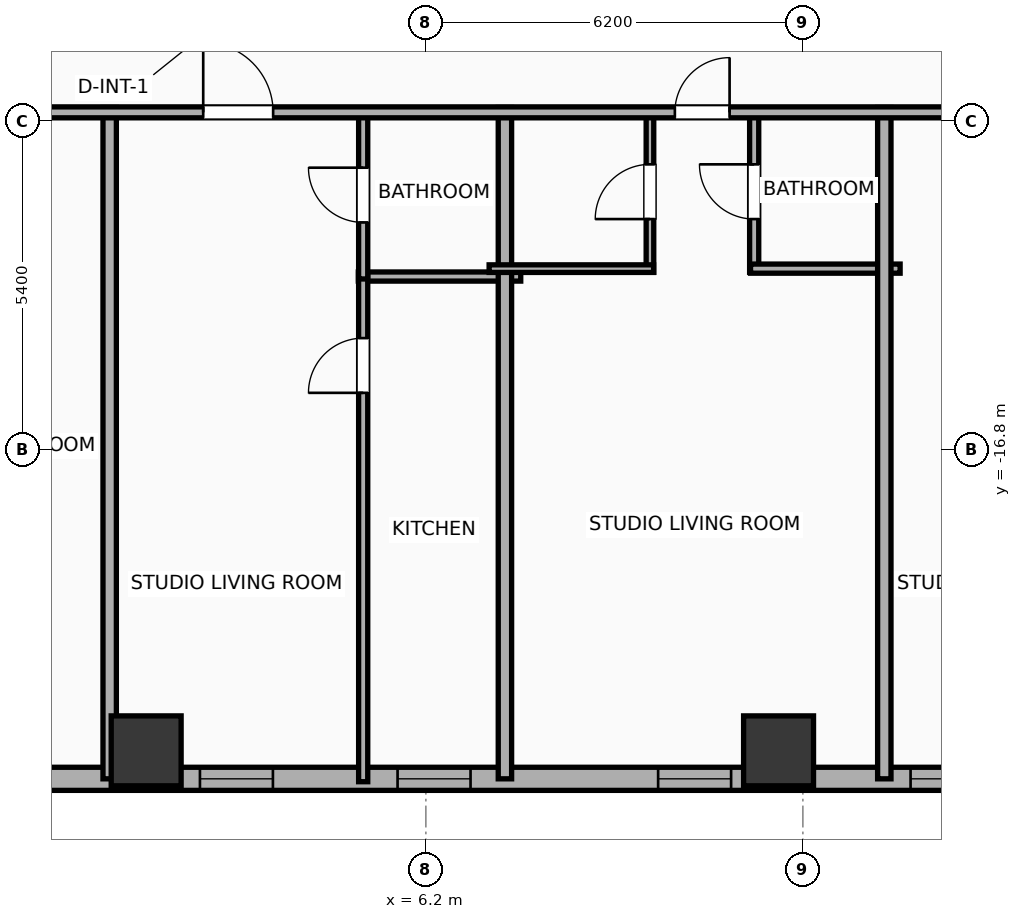
"""IFC4 building model, lengths in metres.
Left out: names, types, materials, properties, quantities, classifications, styles, units other than length and angle.
Written with IfcOpenShell. Run it as: python <this file> out.ifc"""

import sys

from ifc_helpers import new_model, si_unit, direction, frame, frame_2d, origin, origin_2d, place, context, subcontext, project, spatial, rectangle, hollow_rectangle, extrude, element, fill, save


model = new_model("IFC4")
c1 = context("Model", 3, precision=1e-05, world=origin(), true_north=direction((0.0, 1.0)))
c2 = subcontext(c1, "Body", "Model", "MODEL_VIEW")
j1 = project(units=[si_unit("LENGTHUNIT", "METRE"), si_unit("PLANEANGLEUNIT", "RADIAN")], contexts=[c1])
p1 = place(None, origin())
s1 = spatial("IfcSite", under=j1, at=p1, CompositionType="ELEMENT")
p2 = place(p1, origin())
s2 = spatial("IfcBuilding", under=s1, at=p2, CompositionType="ELEMENT")
p3 = place(p2, frame((0.0, 0.0, 76.7)))
s3 = spatial("IfcBuildingStorey", under=s2, at=p3, CompositionType="ELEMENT", Elevation=76.7)
for number, where, z_axis, x_axis in (
    (1, (1.6, -21.75, 0.0), (0.0, 0.0, 1.0), (1.0, 0.0, 0.0)),
    (2, (12.0, -21.75, 0.0), (0.0, 0.0, 1.0), (1.0, 0.0, 0.0)),
):
    element("IfcColumn", number, at=place(p3, frame(where, z_axis=z_axis, x_axis=x_axis)), inside=s3, PredefinedType="COLUMN", context=c2, shape_type="SweptSolid", body=[
        extrude(hollow_rectangle(XDim=1.15, YDim=1.15, WallThickness=0.04, at=origin_2d()), origin(), (0.0, 0.0, 1.0), 3.9),
    ])
p4 = place(p3, frame((22.381, -22.21, 0.0), z_axis=(0.0, 0.0, 1.0), x_axis=(-1.0, 0.0, 0.0)))
e3 = element("IfcWall", 3, at=p4, inside=s3, PredefinedType="ELEMENTEDWALL", context=c2, shape_type="SweptSolid", body=[
    extrude(rectangle(XDim=51.963, YDim=0.38, at=frame_2d((25.981, 0.0))), origin(), (0.0, 0.0, 1.0), 3.6),
])
p5 = place(p4, frame((5.81, 0.0, 0.75)))
e4 = element("IfcOpeningElement", 4, at=p5, cuts=e3, PredefinedType="OPENING", context=c2, shape_type="SweptSolid", body=[
    extrude(rectangle(XDim=2.4, YDim=2.1, at=frame_2d((1.2, 1.05))), frame((0.0, 0.2, 0.0), z_axis=(0.0, -1.0, 0.0), x_axis=(1.0, 0.0, 0.0)), (0.0, 0.0, 1.0), 0.4),
])
p6 = place(p4, frame((49.106, 0.0, 0.75)))
e5 = element("IfcOpeningElement", 5, at=p6, cuts=e3, PredefinedType="OPENING", context=c2, shape_type="SweptSolid", body=[
    extrude(rectangle(XDim=1.2, YDim=2.05, at=frame_2d((0.6, 1.025))), frame((0.0, 0.2, 0.0), z_axis=(0.0, -1.0, 0.0), x_axis=(1.0, 0.0, 0.0)), (0.0, 0.0, 1.0), 0.4),
])
p7 = place(p4, frame((45.716, 0.0, 0.75)))
e6 = element("IfcOpeningElement", 6, at=p7, cuts=e3, PredefinedType="OPENING", context=c2, shape_type="SweptSolid", body=[
    extrude(rectangle(XDim=1.2, YDim=2.05, at=frame_2d((0.6, 1.025))), frame((0.0, 0.2, 0.0), z_axis=(0.0, -1.0, 0.0), x_axis=(1.0, 0.0, 0.0)), (0.0, 0.0, 1.0), 0.4),
])
p8 = place(p4, frame((42.346, 0.0, 0.75)))
e7 = element("IfcOpeningElement", 7, at=p8, cuts=e3, PredefinedType="OPENING", context=c2, shape_type="SweptSolid", body=[
    extrude(rectangle(XDim=1.2, YDim=2.05, at=frame_2d((0.6, 1.025))), frame((0.0, 0.2, 0.0), z_axis=(0.0, -1.0, 0.0), x_axis=(1.0, 0.0, 0.0)), (0.0, 0.0, 1.0), 0.4),
])
p9 = place(p4, frame((35.811, 0.0, 0.75)))
e8 = element("IfcOpeningElement", 8, at=p9, cuts=e3, PredefinedType="OPENING", context=c2, shape_type="SweptSolid", body=[
    extrude(rectangle(XDim=1.2, YDim=2.05, at=frame_2d((0.6, 1.025))), frame((0.0, 0.2, 0.0), z_axis=(0.0, -1.0, 0.0), x_axis=(1.0, 0.0, 0.0)), (0.0, 0.0, 1.0), 0.4),
])
p10 = place(p4, frame((39.061, 0.0, 0.75)))
e9 = element("IfcOpeningElement", 9, at=p10, cuts=e3, PredefinedType="OPENING", context=c2, shape_type="SweptSolid", body=[
    extrude(rectangle(XDim=1.2, YDim=2.05, at=frame_2d((0.6, 1.025))), frame((0.0, 0.2, 0.0), z_axis=(0.0, -1.0, 0.0), x_axis=(1.0, 0.0, 0.0)), (0.0, 0.0, 1.0), 0.4),
])
p11 = place(p4, frame((29.211, 0.0, 0.75)))
e10 = element("IfcOpeningElement", 10, at=p11, cuts=e3, PredefinedType="OPENING", context=c2, shape_type="SweptSolid", body=[
    extrude(rectangle(XDim=1.2, YDim=2.05, at=frame_2d((0.6, 1.025))), frame((0.0, 0.2, 0.0), z_axis=(0.0, -1.0, 0.0), x_axis=(1.0, 0.0, 0.0)), (0.0, 0.0, 1.0), 0.4),
])
p12 = place(p4, frame((22.757, 0.0, 0.75)))
e11 = element("IfcOpeningElement", 11, at=p12, cuts=e3, PredefinedType="OPENING", context=c2, shape_type="SweptSolid", body=[
    extrude(rectangle(XDim=1.2, YDim=2.05, at=frame_2d((0.6, 1.025))), frame((0.0, 0.2, 0.0), z_axis=(0.0, -1.0, 0.0), x_axis=(1.0, 0.0, 0.0)), (0.0, 0.0, 1.0), 0.4),
])
p13 = place(p4, frame((26.007, 0.0, 0.75)))
e12 = element("IfcOpeningElement", 12, at=p13, cuts=e3, PredefinedType="OPENING", context=c2, shape_type="SweptSolid", body=[
    extrude(rectangle(XDim=1.2, YDim=2.05, at=frame_2d((0.6, 1.025))), frame((0.0, 0.2, 0.0), z_axis=(0.0, -1.0, 0.0), x_axis=(1.0, 0.0, 0.0)), (0.0, 0.0, 1.0), 0.4),
])
p14 = place(p4, frame((18.697, 0.0, 0.75)))
e13 = element("IfcOpeningElement", 13, at=p14, cuts=e3, PredefinedType="OPENING", context=c2, shape_type="SweptSolid", body=[
    extrude(rectangle(XDim=1.2, YDim=2.05, at=frame_2d((0.6, 1.025))), frame((0.0, 0.2, 0.0), z_axis=(0.0, -1.0, 0.0), x_axis=(1.0, 0.0, 0.0)), (0.0, 0.0, 1.0), 0.4),
])
p15 = place(p4, frame((15.447, 0.0, 0.75)))
e14 = element("IfcOpeningElement", 14, at=p15, cuts=e3, PredefinedType="OPENING", context=c2, shape_type="SweptSolid", body=[
    extrude(rectangle(XDim=1.2, YDim=2.05, at=frame_2d((0.6, 1.025))), frame((0.0, 0.2, 0.0), z_axis=(0.0, -1.0, 0.0), x_axis=(1.0, 0.0, 0.0)), (0.0, 0.0, 1.0), 0.4),
])
p16 = place(p4, frame((11.162, 0.0, 0.75)))
e15 = element("IfcOpeningElement", 15, at=p16, cuts=e3, PredefinedType="OPENING", context=c2, shape_type="SweptSolid", body=[
    extrude(rectangle(XDim=1.2, YDim=2.05, at=frame_2d((0.6, 1.025))), frame((0.0, 0.2, 0.0), z_axis=(0.0, -1.0, 0.0), x_axis=(1.0, 0.0, 0.0)), (0.0, 0.0, 1.0), 0.4),
])
p17 = place(p4, frame((2.974, 0.0, 0.75)))
e16 = element("IfcOpeningElement", 16, at=p17, cuts=e3, PredefinedType="OPENING", context=c2, shape_type="SweptSolid", body=[
    extrude(rectangle(XDim=1.2, YDim=2.05, at=frame_2d((0.6, 1.025))), frame((0.0, 0.2, 0.0), z_axis=(0.0, -1.0, 0.0), x_axis=(1.0, 0.0, 0.0)), (0.0, 0.0, 1.0), 0.4),
])
p18 = place(p4, frame((0.927, 0.0, 0.75)))
e17 = element("IfcOpeningElement", 17, at=p18, cuts=e3, PredefinedType="OPENING", context=c2, shape_type="SweptSolid", body=[
    extrude(rectangle(XDim=1.2, YDim=2.05, at=frame_2d((0.6, 1.025))), frame((0.0, 0.2, 0.0), z_axis=(0.0, -1.0, 0.0), x_axis=(1.0, 0.0, 0.0)), (0.0, 0.0, 1.0), 0.4),
])
p19 = place(p3, frame((1.0, -22.21, 0.0), z_axis=(0.0, 0.0, 1.0), x_axis=(0.0, 1.0, 0.0)))
e18 = element("IfcWall", 18, at=p19, inside=s3, PredefinedType="PARTITIONING", context=c2, shape_type="SweptSolid", body=[
    extrude(rectangle(XDim=11.04, YDim=0.22, at=frame_2d((5.52, 0.0))), origin(), (0.0, 0.0, 1.0), 3.6),
])
p20 = place(p3, frame((5.089, -13.95, 0.0), z_axis=(0.0, 0.0, 1.0), x_axis=(1.0, 0.0, 0.0)))
e19 = element("IfcWall", 19, at=p20, inside=s3, PredefinedType="PLUMBINGWALL", context=c2, shape_type="SweptSolid", body=[
    extrude(rectangle(XDim=2.671, YDim=0.15, at=frame_2d((1.335, 0.0))), origin(), (0.0, 0.0, 1.0), 3.6),
])
p21 = place(p3, frame((5.169, -22.258, 0.0), z_axis=(0.0, 0.0, 1.0), x_axis=(0.0, 1.0, 0.0)))
e20 = element("IfcWall", 20, at=p21, inside=s3, PredefinedType="PLUMBINGWALL", context=c2, shape_type="SweptSolid", body=[
    extrude(rectangle(XDim=8.348, YDim=0.15, at=frame_2d((4.174, 0.0))), origin(), (0.0, 0.0, 1.0), 3.6),
])
p22 = place(p21, frame((6.395, 0.0, 0.0)))
e21 = element("IfcOpeningElement", 21, at=p22, cuts=e20, PredefinedType="OPENING", context=c2, shape_type="SweptSolid", body=[
    extrude(rectangle(XDim=0.9, YDim=2.05, at=frame_2d((0.45, 1.025))), frame((0.0, 0.085, 0.0), z_axis=(0.0, -1.0, 0.0), x_axis=(1.0, 0.0, 0.0)), (0.0, 0.0, 1.0), 0.17),
])
p23 = place(p3, frame((5.169, -13.99, 0.0), z_axis=(0.0, 0.0, 1.0), x_axis=(0.0, 1.0, 0.0)))
e22 = element("IfcWall", 22, at=p23, inside=s3, PredefinedType="PLUMBINGWALL", context=c2, shape_type="SweptSolid", body=[
    extrude(rectangle(XDim=2.76, YDim=0.15, at=frame_2d((1.38, 0.0))), origin(), (0.0, 0.0, 1.0), 3.6),
])
p24 = place(p23, frame((0.93, 0.0, 0.0)))
e23 = element("IfcOpeningElement", 23, at=p24, cuts=e22, PredefinedType="OPENING", context=c2, shape_type="SweptSolid", body=[
    extrude(rectangle(XDim=0.9, YDim=2.05, at=frame_2d((0.45, 1.025))), frame((0.0, 0.085, 0.0), z_axis=(0.0, -1.0, 0.0), x_axis=(1.0, 0.0, 0.0)), (0.0, 0.0, 1.0), 0.17),
])
p25 = place(p3, frame((7.5, -22.21, 0.0), z_axis=(0.0, 0.0, 1.0), x_axis=(0.0, 1.0, 0.0)))
e24 = element("IfcWall", 24, at=p25, inside=s3, PredefinedType="PARTITIONING", context=c2, shape_type="SweptSolid", body=[
    extrude(rectangle(XDim=11.04, YDim=0.22, at=frame_2d((5.52, 0.0))), origin(), (0.0, 0.0, 1.0), 3.6),
])
p26 = place(p3, frame((9.885, -13.88, 0.0), z_axis=(0.0, 0.0, 1.0), x_axis=(0.0, 1.0, 0.0)))
e25 = element("IfcWall", 25, at=p26, inside=s3, PredefinedType="PARTITIONING", context=c2, shape_type="SweptSolid", body=[
    extrude(rectangle(XDim=2.65, YDim=0.125, at=frame_2d((1.325, 0.0))), origin(), (0.0, 0.0, 1.0), 3.6),
])
p27 = place(p26, frame((0.875, 0.0, 0.0)))
e26 = element("IfcOpeningElement", 26, at=p27, cuts=e25, PredefinedType="OPENING", context=c2, shape_type="SweptSolid", body=[
    extrude(rectangle(XDim=0.9, YDim=2.05, at=frame_2d((0.45, 1.025))), frame((0.0, 0.073, 0.0), z_axis=(0.0, -1.0, 0.0), x_axis=(1.0, 0.0, 0.0)), (0.0, 0.0, 1.0), 0.145),
])
p28 = place(p3, frame((11.599, -13.88, 0.0), z_axis=(0.0, 0.0, 1.0), x_axis=(0.0, 1.0, 0.0)))
e27 = element("IfcWall", 27, at=p28, inside=s3, PredefinedType="PLUMBINGWALL", context=c2, shape_type="SweptSolid", body=[
    extrude(rectangle(XDim=2.65, YDim=0.15, at=frame_2d((1.325, 0.0))), origin(), (0.0, 0.0, 1.0), 3.6),
])
p29 = place(p28, frame((0.875, 0.0, 0.0)))
e28 = element("IfcOpeningElement", 28, at=p29, cuts=e27, PredefinedType="OPENING", context=c2, shape_type="SweptSolid", body=[
    extrude(rectangle(XDim=0.9, YDim=2.05, at=frame_2d((0.45, 1.025))), frame((0.0, 0.085, 0.0), z_axis=(0.0, -1.0, 0.0), x_axis=(1.0, 0.0, 0.0)), (0.0, 0.0, 1.0), 0.17),
])
p30 = place(p3, frame((7.24, -13.82, 0.0), z_axis=(0.0, 0.0, 1.0), x_axis=(1.0, 0.0, 0.0)))
e29 = element("IfcWall", 29, at=p30, inside=s3, PredefinedType="PARTITIONING", context=c2, shape_type="SweptSolid", body=[
    extrude(rectangle(XDim=2.705, YDim=0.125, at=frame_2d((1.353, 0.0))), origin(), (0.0, 0.0, 1.0), 3.6),
])
p31 = place(p3, frame((11.539, -13.82, 0.0), z_axis=(0.0, 0.0, 1.0), x_axis=(1.0, 0.0, 0.0)))
e30 = element("IfcWall", 30, at=p31, inside=s3, PredefinedType="PLUMBINGWALL", context=c2, shape_type="SweptSolid", body=[
    extrude(rectangle(XDim=2.46, YDim=0.15, at=frame_2d((1.23, 0.0))), origin(), (0.0, 0.0, 1.0), 3.6),
])
p32 = place(p3, frame((13.739, -22.21, 0.0), z_axis=(0.0, 0.0, 1.0), x_axis=(0.0, 1.0, 0.0)))
e31 = element("IfcWall", 31, at=p32, inside=s3, PredefinedType="PARTITIONING", context=c2, shape_type="SweptSolid", body=[
    extrude(rectangle(XDim=11.04, YDim=0.22, at=frame_2d((5.52, 0.0))), origin(), (0.0, 0.0, 1.0), 3.6),
])
p33 = place(p3, frame((-33.41, -11.25, 0.0), z_axis=(0.0, 0.0, 1.0), x_axis=(1.0, 0.0, 0.0)))
e32 = element("IfcWall", 32, at=p33, inside=s3, PredefinedType="PARTITIONING", context=c2, shape_type="SweptSolid", body=[
    extrude(rectangle(XDim=59.62, YDim=0.18, at=frame_2d((29.81, 0.0))), origin(), (0.0, 0.0, 1.0), 3.6),
])
p34 = place(p33, frame((3.282, 0.0, 0.0)))
e33 = element("IfcOpeningElement", 33, at=p34, cuts=e32, PredefinedType="OPENING", context=c2, shape_type="SweptSolid", body=[
    extrude(rectangle(XDim=1.15, YDim=2.05, at=frame_2d((0.575, 1.025))), frame((0.0, 0.1, 0.0), z_axis=(0.0, -1.0, 0.0), x_axis=(1.0, 0.0, 0.0)), (0.0, 0.0, 1.0), 0.2),
])
p35 = place(p33, frame((10.771, 0.0, 0.0)))
e34 = element("IfcOpeningElement", 34, at=p35, cuts=e32, PredefinedType="OPENING", context=c2, shape_type="SweptSolid", body=[
    extrude(rectangle(XDim=1.15, YDim=2.05, at=frame_2d((0.575, 1.025))), frame((0.0, 0.1, 0.0), z_axis=(0.0, -1.0, 0.0), x_axis=(1.0, 0.0, 0.0)), (0.0, 0.0, 1.0), 0.2),
])
p36 = place(p33, frame((18.778, 0.0, 0.0)))
e35 = element("IfcOpeningElement", 35, at=p36, cuts=e32, PredefinedType="OPENING", context=c2, shape_type="SweptSolid", body=[
    extrude(rectangle(XDim=1.15, YDim=2.05, at=frame_2d((0.575, 1.025))), frame((0.0, 0.1, 0.0), z_axis=(0.0, -1.0, 0.0), x_axis=(1.0, 0.0, 0.0)), (0.0, 0.0, 1.0), 0.2),
])
p37 = place(p33, frame((24.34, 0.0, 0.0)))
e36 = element("IfcOpeningElement", 36, at=p37, cuts=e32, PredefinedType="OPENING", context=c2, shape_type="SweptSolid", body=[
    extrude(rectangle(XDim=0.9, YDim=2.05, at=frame_2d((0.45, 1.025))), frame((0.0, 0.1, 0.0), z_axis=(0.0, -1.0, 0.0), x_axis=(1.0, 0.0, 0.0)), (0.0, 0.0, 1.0), 0.2),
])
p38 = place(p33, frame((31.829, 0.0, 0.0)))
e37 = element("IfcOpeningElement", 37, at=p38, cuts=e32, PredefinedType="OPENING", context=c2, shape_type="SweptSolid", body=[
    extrude(rectangle(XDim=1.15, YDim=2.05, at=frame_2d((0.575, 1.025))), frame((0.0, 0.1, 0.0), z_axis=(0.0, -1.0, 0.0), x_axis=(1.0, 0.0, 0.0)), (0.0, 0.0, 1.0), 0.2),
])
p39 = place(p33, frame((35.948, 0.0, 0.0)))
e38 = element("IfcOpeningElement", 38, at=p39, cuts=e32, PredefinedType="OPENING", context=c2, shape_type="SweptSolid", body=[
    extrude(rectangle(XDim=1.15, YDim=2.05, at=frame_2d((0.575, 1.025))), frame((0.0, 0.1, 0.0), z_axis=(0.0, -1.0, 0.0), x_axis=(1.0, 0.0, 0.0)), (0.0, 0.0, 1.0), 0.2),
])
p40 = place(p33, frame((43.705, 0.0, 0.0)))
e39 = element("IfcOpeningElement", 39, at=p40, cuts=e32, PredefinedType="OPENING", context=c2, shape_type="SweptSolid", body=[
    extrude(rectangle(XDim=0.9, YDim=2.05, at=frame_2d((0.45, 1.025))), frame((0.0, 0.1, 0.0), z_axis=(0.0, -1.0, 0.0), x_axis=(1.0, 0.0, 0.0)), (0.0, 0.0, 1.0), 0.2),
])
p41 = place(p33, frame((48.552, 0.0, 0.0)))
e40 = element("IfcOpeningElement", 40, at=p41, cuts=e32, PredefinedType="OPENING", context=c2, shape_type="SweptSolid", body=[
    extrude(rectangle(XDim=1.15, YDim=2.05, at=frame_2d((0.575, 1.025))), frame((0.0, 0.1, 0.0), z_axis=(0.0, -1.0, 0.0), x_axis=(1.0, 0.0, 0.0)), (0.0, 0.0, 1.0), 0.2),
])
p42 = place(p33, frame((56.213, 0.0, 0.0)))
e41 = element("IfcOpeningElement", 41, at=p42, cuts=e32, PredefinedType="OPENING", context=c2, shape_type="SweptSolid", body=[
    extrude(rectangle(XDim=0.9, YDim=2.05, at=frame_2d((0.45, 1.025))), frame((0.0, 0.1, 0.0), z_axis=(0.0, -1.0, 0.0), x_axis=(1.0, 0.0, 0.0)), (0.0, 0.0, 1.0), 0.2),
])
p43 = place(p5, origin())
e42 = element("IfcWindow", 42, at=p43, inside=s3, PartitioningType="SINGLE_PANEL", PredefinedType="WINDOW", context=c2, shape_type="SweptSolid", body=[
    extrude(rectangle(XDim=2.4, YDim=2.1, at=frame_2d((1.2, 1.05))), frame((0.0, 0.03, 0.0), z_axis=(0.0, -1.0, 0.0), x_axis=(1.0, 0.0, 0.0)), (0.0, 0.0, 1.0), 0.06),
])
fill(e4, e42)
p44 = place(p14, origin())
e43 = element("IfcWindow", 43, at=p44, inside=s3, PartitioningType="SINGLE_PANEL", PredefinedType="WINDOW", context=c2, shape_type="SweptSolid", body=[
    extrude(rectangle(XDim=1.2, YDim=2.05, at=frame_2d((0.6, 1.025))), frame((0.0, 0.03, 0.0), z_axis=(0.0, -1.0, 0.0), x_axis=(1.0, 0.0, 0.0)), (0.0, 0.0, 1.0), 0.06),
])
fill(e13, e43)
p45 = place(p15, origin())
e44 = element("IfcWindow", 44, at=p45, inside=s3, PartitioningType="SINGLE_PANEL", PredefinedType="WINDOW", context=c2, shape_type="SweptSolid", body=[
    extrude(rectangle(XDim=1.2, YDim=2.05, at=frame_2d((0.6, 1.025))), frame((0.0, 0.03, 0.0), z_axis=(0.0, -1.0, 0.0), x_axis=(1.0, 0.0, 0.0)), (0.0, 0.0, 1.0), 0.06),
])
fill(e14, e44)
p46 = place(p16, origin())
e45 = element("IfcWindow", 45, at=p46, inside=s3, PartitioningType="SINGLE_PANEL", PredefinedType="WINDOW", context=c2, shape_type="SweptSolid", body=[
    extrude(rectangle(XDim=1.2, YDim=2.05, at=frame_2d((0.6, 1.025))), frame((0.0, 0.03, 0.0), z_axis=(0.0, -1.0, 0.0), x_axis=(1.0, 0.0, 0.0)), (0.0, 0.0, 1.0), 0.06),
])
fill(e15, e45)
p47 = place(p22, origin())
e46 = element("IfcDoor", 46, at=p47, inside=s3, OperationType="SINGLE_SWING_LEFT", PredefinedType="DOOR", context=c2, shape_type="SweptSolid", body=[
    extrude(rectangle(XDim=0.9, YDim=2.05, at=frame_2d((0.45, 1.025))), frame((0.0, 0.025, 0.0), z_axis=(0.0, -1.0, 0.0), x_axis=(1.0, 0.0, 0.0)), (0.0, 0.0, 1.0), 0.05),
])
fill(e21, e46)
p48 = place(p24, origin())
e47 = element("IfcDoor", 47, at=p48, inside=s3, OperationType="SINGLE_SWING_RIGHT", PredefinedType="DOOR", context=c2, shape_type="SweptSolid", body=[
    extrude(rectangle(XDim=0.9, YDim=2.05, at=frame_2d((0.45, 1.025))), frame((0.0, 0.025, 0.0), z_axis=(0.0, -1.0, 0.0), x_axis=(1.0, 0.0, 0.0)), (0.0, 0.0, 1.0), 0.05),
])
fill(e23, e47)
p49 = place(p27, origin())
e48 = element("IfcDoor", 48, at=p49, inside=s3, OperationType="SINGLE_SWING_LEFT", PredefinedType="DOOR", context=c2, shape_type="SweptSolid", body=[
    extrude(rectangle(XDim=0.9, YDim=2.05, at=frame_2d((0.45, 1.025))), frame((0.0, 0.025, 0.0), z_axis=(0.0, -1.0, 0.0), x_axis=(1.0, 0.0, 0.0)), (0.0, 0.0, 1.0), 0.05),
])
fill(e26, e48)
p50 = place(p29, origin())
e49 = element("IfcDoor", 49, at=p50, inside=s3, OperationType="SINGLE_SWING_RIGHT", PredefinedType="DOOR", context=c2, shape_type="SweptSolid", body=[
    extrude(rectangle(XDim=0.9, YDim=2.05, at=frame_2d((0.45, 1.025))), frame((0.0, 0.025, 0.0), z_axis=(0.0, -1.0, 0.0), x_axis=(1.0, 0.0, 0.0)), (0.0, 0.0, 1.0), 0.05),
])
fill(e28, e49)
p51 = place(p39, origin())
e50 = element("IfcDoor", 50, at=p51, inside=s3, OperationType="SINGLE_SWING_LEFT", PredefinedType="DOOR", context=c2, shape_type="SweptSolid", body=[
    extrude(rectangle(XDim=1.15, YDim=2.05, at=frame_2d((0.575, 1.025))), frame((0.0, 0.025, 0.0), z_axis=(0.0, -1.0, 0.0), x_axis=(1.0, 0.0, 0.0)), (0.0, 0.0, 1.0), 0.05),
])
fill(e38, e50)
p52 = place(p40, origin())
e51 = element("IfcDoor", 51, at=p52, inside=s3, OperationType="SINGLE_SWING_RIGHT", PredefinedType="DOOR", context=c2, shape_type="SweptSolid", body=[
    extrude(rectangle(XDim=0.9, YDim=2.05, at=frame_2d((0.45, 1.025))), frame((0.0, 0.025, 0.0), z_axis=(0.0, -1.0, 0.0), x_axis=(1.0, 0.0, 0.0)), (0.0, 0.0, 1.0), 0.05),
])
fill(e39, e51)
save(model, sys.argv[1])
